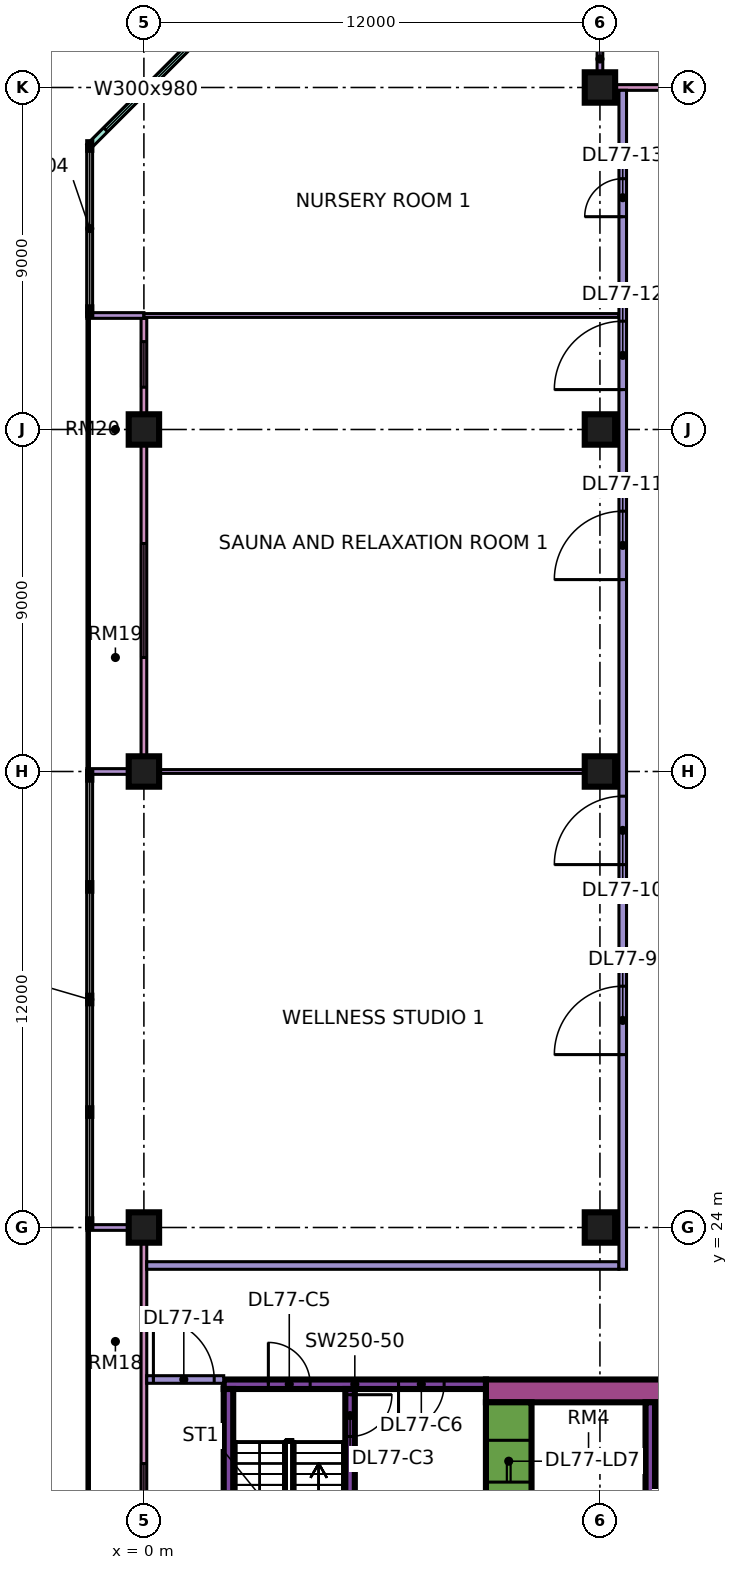
"""IFC4 building model, lengths in metres.
Left out: names, types, materials, properties, quantities, classifications, styles, units other than length and angle.
Written with IfcOpenShell. Run it as: python <this file> out.ifc"""

import sys

from ifc_helpers import new_model, si_unit, direction, frame, frame_2d, origin, origin_2d, place, context, subcontext, project, spatial, rectangle, extrude, element, fill, save


model = new_model("IFC4")
c1 = context("Model", 3, precision=1e-05, world=origin(), true_north=direction((0.0, 1.0)))
c2 = subcontext(c1, "Body", "Model", "MODEL_VIEW")
j1 = project(units=[si_unit("LENGTHUNIT", "METRE"), si_unit("PLANEANGLEUNIT", "RADIAN")], contexts=[c1])
p1 = place(None, origin())
s1 = spatial("IfcSite", under=j1, at=p1, CompositionType="ELEMENT")
p2 = place(p1, origin())
s2 = spatial("IfcBuilding", under=s1, at=p2, CompositionType="ELEMENT")
p3 = place(p2, frame((0.0, 0.0, 327.65)))
s3 = spatial("IfcBuildingStorey", under=s2, at=p3, CompositionType="ELEMENT", Elevation=327.65)
p4 = place(p3, frame((0.0, 24.0, 0.0), z_axis=(0.0, 0.0, 1.0), x_axis=(1.0, 0.0, 0.0)))
e1 = element("IfcColumn", 1, at=p4, inside=s3, PredefinedType="COLUMN", context=c2, shape_type="SweptSolid", body=[
    extrude(rectangle(XDim=0.8, YDim=0.8, at=origin_2d()), origin(), (0.0, 0.0, 1.0), 11.25),
])
p5 = place(p3, frame((0.0, 36.0, 0.0), z_axis=(0.0, 0.0, 1.0), x_axis=(1.0, 0.0, 0.0)))
e2 = element("IfcColumn", 2, at=p5, inside=s3, PredefinedType="COLUMN", context=c2, shape_type="SweptSolid", body=[
    extrude(rectangle(XDim=0.8, YDim=0.8, at=origin_2d()), origin(), (0.0, 0.0, 1.0), 11.25),
])
for number, where, z_axis, x_axis in (
    (3, (0.0, 45.0, 0.0), (0.0, 0.0, 1.0), (1.0, 0.0, 0.0)),
    (4, (12.0, 24.0, 0.0), (0.0, 0.0, 1.0), (1.0, 0.0, 0.0)),
    (5, (12.0, 36.0, 0.0), (0.0, 0.0, 1.0), (1.0, 0.0, 0.0)),
    (6, (12.0, 45.0, 0.0), (0.0, 0.0, 1.0), (1.0, 0.0, 0.0)),
    (7, (12.0, 54.0, 0.0), (0.0, 0.0, 1.0), (1.0, 0.0, 0.0)),
):
    element("IfcColumn", number, at=place(p3, frame(where, z_axis=z_axis, x_axis=x_axis)), inside=s3, PredefinedType="COLUMN", context=c2, shape_type="SweptSolid", body=[
        extrude(rectangle(XDim=0.8, YDim=0.8, at=origin_2d()), origin(), (0.0, 0.0, 1.0), 11.25),
    ])
p6 = place(p3, frame((9.0, 19.7, 0.0), z_axis=(0.0, 0.0, 1.0), x_axis=(1.0, 0.0, 0.0)))
e8 = element("IfcWall", 8, at=p6, inside=s3, PredefinedType="SHEAR", context=c2, shape_type="SweptSolid", body=[
    extrude(rectangle(XDim=25.0, YDim=0.6, at=frame_2d((12.5, 0.0))), origin(), (0.0, 0.0, 1.0), 11.25),
])
p7 = place(p6, frame((19.1, 0.0, 0.0)))
e9 = element("IfcOpeningElement", 9, at=p7, cuts=e8, PredefinedType="OPENING", context=c2, shape_type="SweptSolid", body=[
    extrude(rectangle(XDim=1.8, YDim=2.4, at=frame_2d((0.9, 1.2))), frame((0.0, 0.31, 0.0), z_axis=(0.0, -1.0, 0.0), x_axis=(1.0, 0.0, 0.0)), (0.0, 0.0, 1.0), 0.62),
])
p8 = place(p3, frame((9.6, 7.6, 0.0), z_axis=(0.0, 0.0, 1.0), x_axis=(0.0, 1.0, 0.0)))
e10 = element("IfcWall", 10, at=p8, inside=s3, PredefinedType="SHEAR", context=c2, shape_type="SweptSolid", body=[
    extrude(rectangle(XDim=11.8, YDim=1.2, at=frame_2d((5.9, 0.0))), origin(), (0.0, 0.0, 1.0), 11.25),
])
p9 = place(p8, frame((4.275, 0.0, 0.0)))
e11 = element("IfcOpeningElement", 11, at=p9, cuts=e10, PredefinedType="OPENING", context=c2, shape_type="SweptSolid", body=[
    extrude(rectangle(XDim=1.1, YDim=2.2, at=frame_2d((0.55, 1.1))), frame((0.0, 0.61, 0.0), z_axis=(0.0, -1.0, 0.0), x_axis=(1.0, 0.0, 0.0)), (0.0, 0.0, 1.0), 1.22),
])
p10 = place(p8, frame((6.775, 0.0, 0.0)))
e12 = element("IfcOpeningElement", 12, at=p10, cuts=e10, PredefinedType="OPENING", context=c2, shape_type="SweptSolid", body=[
    extrude(rectangle(XDim=1.1, YDim=2.2, at=frame_2d((0.55, 1.1))), frame((0.0, 0.61, 0.0), z_axis=(0.0, -1.0, 0.0), x_axis=(1.0, 0.0, 0.0)), (0.0, 0.0, 1.0), 1.22),
])
p11 = place(p8, frame((9.7, 0.0, 0.0)))
e13 = element("IfcOpeningElement", 13, at=p11, cuts=e10, PredefinedType="OPENING", context=c2, shape_type="SweptSolid", body=[
    extrude(rectangle(XDim=1.1, YDim=2.2, at=frame_2d((0.55, 1.1))), frame((0.0, 0.61, 0.0), z_axis=(0.0, -1.0, 0.0), x_axis=(1.0, 0.0, 0.0)), (0.0, 0.0, 1.0), 1.22),
])
p12 = place(p8, frame((1.95, 0.0, 0.0)))
e14 = element("IfcOpeningElement", 14, at=p12, cuts=e10, PredefinedType="OPENING", context=c2, shape_type="SweptSolid", body=[
    extrude(rectangle(XDim=0.9, YDim=2.1, at=frame_2d((0.45, 1.05))), frame((0.0, 0.61, 0.0), z_axis=(0.0, -1.0, 0.0), x_axis=(1.0, 0.0, 0.0)), (0.0, 0.0, 1.0), 1.22),
])
p13 = place(p3, frame((13.325, 7.6, 0.0), z_axis=(0.0, 0.0, 1.0), x_axis=(0.0, 1.0, 0.0)))
e15 = element("IfcWall", 15, at=p13, inside=s3, PredefinedType="SHEAR", context=c2, shape_type="SweptSolid", body=[
    extrude(rectangle(XDim=11.8, YDim=0.25, at=frame_2d((5.9, 0.0))), origin(), (0.0, 0.0, 1.0), 11.25),
])
p14 = place(p3, frame((2.1, 19.875, 0.0), z_axis=(0.0, 0.0, 1.0), x_axis=(1.0, 0.0, 0.0)))
e16 = element("IfcWall", 16, at=p14, inside=s3, PredefinedType="SHEAR", context=c2, shape_type="SweptSolid", body=[
    extrude(rectangle(XDim=6.9, YDim=0.25, at=frame_2d((3.45, 0.0))), origin(), (0.0, 0.0, 1.0), 11.25),
])
p15 = place(p14, frame((1.175, 0.0, 0.0)))
e17 = element("IfcOpeningElement", 17, at=p15, cuts=e16, PredefinedType="OPENING", context=c2, shape_type="SweptSolid", body=[
    extrude(rectangle(XDim=1.1, YDim=2.2, at=frame_2d((0.55, 1.1))), frame((0.0, 0.135, 0.0), z_axis=(0.0, -1.0, 0.0), x_axis=(1.0, 0.0, 0.0)), (0.0, 0.0, 1.0), 0.27),
])
p16 = place(p14, frame((4.6, 0.0, 0.0)))
e18 = element("IfcOpeningElement", 18, at=p16, cuts=e16, PredefinedType="OPENING", context=c2, shape_type="SweptSolid", body=[
    extrude(rectangle(XDim=1.2, YDim=2.2, at=frame_2d((0.6, 1.1))), frame((0.0, 0.135, 0.0), z_axis=(0.0, -1.0, 0.0), x_axis=(1.0, 0.0, 0.0)), (0.0, 0.0, 1.0), 0.27),
])
p17 = place(p3, frame((2.225, 13.25, 0.0), z_axis=(0.0, 0.0, 1.0), x_axis=(0.0, 1.0, 0.0)))
e19 = element("IfcWall", 19, at=p17, inside=s3, PredefinedType="SHEAR", context=c2, shape_type="SweptSolid", body=[
    extrude(rectangle(XDim=6.5, YDim=0.25, at=frame_2d((3.25, 0.0))), origin(), (0.0, 0.0, 1.0), 11.25),
])
p18 = place(p3, frame((5.425, 13.25, 0.0), z_axis=(0.0, 0.0, 1.0), x_axis=(0.0, 1.0, 0.0)))
e20 = element("IfcWall", 20, at=p18, inside=s3, PredefinedType="SHEAR", context=c2, shape_type="SweptSolid", body=[
    extrude(rectangle(XDim=6.5, YDim=0.25, at=frame_2d((3.25, 0.0))), origin(), (0.0, 0.0, 1.0), 11.25),
])
p19 = place(p18, frame((5.25, 0.0, 0.0)))
e21 = element("IfcOpeningElement", 21, at=p19, cuts=e20, PredefinedType="OPENING", context=c2, shape_type="SweptSolid", body=[
    extrude(rectangle(XDim=1.1, YDim=2.2, at=frame_2d((0.55, 1.1))), frame((0.0, 0.135, 0.0), z_axis=(0.0, -1.0, 0.0), x_axis=(1.0, 0.0, 0.0)), (0.0, 0.0, 1.0), 0.27),
])
p20 = place(p3, frame((22.425, 54.0, 0.0), z_axis=(0.0, 0.0, 1.0), x_axis=(-1.0, 0.0, 0.0)))
e22 = element("IfcWall", 22, at=p20, inside=s3, PredefinedType="SOLIDWALL", context=c2, shape_type="SweptSolid", body=[
    extrude(rectangle(XDim=10.35, YDim=0.15, at=frame_2d((5.175, 0.0))), origin(), (0.0, 0.0, 1.0), 10.85),
])
p21 = place(p20, frame((1.913, 0.0, 0.45)))
e23 = element("IfcOpeningElement", 23, at=p21, cuts=e22, PredefinedType="OPENING", context=c2, shape_type="SweptSolid", body=[
    extrude(rectangle(XDim=3.0, YDim=9.8, at=frame_2d((1.5, 4.9))), frame((0.0, 0.085, 0.0), z_axis=(0.0, -1.0, 0.0), x_axis=(1.0, 0.0, 0.0)), (0.0, 0.0, 1.0), 0.17),
])
p22 = place(p3, frame((12.0, 55.5, 0.0), z_axis=(0.0, 0.0, 1.0), x_axis=(0.0, -1.0, 0.0)))
e24 = element("IfcWall", 24, at=p22, inside=s3, PredefinedType="SOLIDWALL", context=c2, shape_type="SweptSolid", body=[
    extrude(rectangle(XDim=1.5, YDim=0.15, at=frame_2d((0.75, 0.0))), origin(), (0.0, 0.0, 1.0), 10.85),
])
p23 = place(p3, frame((1.553, 55.447, 0.0), z_axis=(0.0, 0.0, 1.0), x_axis=(-0.707106781187, -0.707106781187, 0.0)))
e25 = element("IfcWall", 25, at=p23, inside=s3, PredefinedType="SOLIDWALL", context=c2, shape_type="SweptSolid", body=[
    extrude(rectangle(XDim=4.243, YDim=0.15, at=frame_2d((2.121, 0.0))), origin(), (0.0, 0.0, 1.0), 10.85),
])
p24 = place(p23, frame((0.621, 0.0, 0.45)))
e26 = element("IfcOpeningElement", 26, at=p24, cuts=e25, PredefinedType="OPENING", context=c2, shape_type="SweptSolid", body=[
    extrude(rectangle(XDim=3.0, YDim=9.8, at=frame_2d((1.5, 4.9))), frame((0.0, 0.085, 0.0), z_axis=(0.0, -1.0, 0.0), x_axis=(1.0, 0.0, 0.0)), (0.0, 0.0, 1.0), 0.17),
])
p25 = place(p3, frame((0.0, 47.925, 0.0), z_axis=(0.0, 0.0, 1.0), x_axis=(0.0, -1.0, 0.0)))
e27 = element("IfcWall", 27, at=p25, inside=s3, PredefinedType="SOLIDWALL", context=c2, shape_type="SweptSolid", body=[
    extrude(rectangle(XDim=11.85, YDim=0.15, at=frame_2d((5.925, 0.0))), origin(), (0.0, 0.0, 1.0), 10.85),
])
p26 = place(p25, frame((0.613, 0.0, 0.45)))
e28 = element("IfcOpeningElement", 28, at=p26, cuts=e27, PredefinedType="OPENING", context=c2, shape_type="SweptSolid", body=[
    extrude(rectangle(XDim=1.2, YDim=9.8, at=frame_2d((0.6, 4.9))), frame((0.0, 0.085, 0.0), z_axis=(0.0, -1.0, 0.0), x_axis=(1.0, 0.0, 0.0)), (0.0, 0.0, 1.0), 0.17),
])
p27 = place(p25, frame((5.925, 0.0, 0.45)))
e29 = element("IfcOpeningElement", 29, at=p27, cuts=e27, PredefinedType="OPENING", context=c2, shape_type="SweptSolid", body=[
    extrude(rectangle(XDim=3.0, YDim=9.8, at=frame_2d((1.5, 4.9))), frame((0.0, 0.085, 0.0), z_axis=(0.0, -1.0, 0.0), x_axis=(1.0, 0.0, 0.0)), (0.0, 0.0, 1.0), 0.17),
])
for number, where, z_axis, x_axis in (
    (30, (-1.5, 48.0, 0.0), (0.0, 0.0, 1.0), (1.0, 0.0, 0.0)),
    (31, (-1.5, 36.0, 0.0), (0.0, 0.0, 1.0), (1.0, 0.0, 0.0)),
):
    element("IfcWall", number, at=place(p3, frame(where, z_axis=z_axis, x_axis=x_axis)), inside=s3, PredefinedType="SOLIDWALL", context=c2, shape_type="SweptSolid", body=[
        extrude(rectangle(XDim=1.5, YDim=0.15, at=frame_2d((0.75, 0.0))), origin(), (0.0, 0.0, 1.0), 10.85),
    ])
p28 = place(p3, frame((0.0, 23.925, 0.0), z_axis=(0.0, 0.0, 1.0), x_axis=(0.0, -1.0, 0.0)))
e32 = element("IfcWall", 32, at=p28, inside=s3, PredefinedType="SOLIDWALL", context=c2, shape_type="SweptSolid", body=[
    extrude(rectangle(XDim=11.35, YDim=0.15, at=frame_2d((5.675, 0.0))), origin(), (0.0, 0.0, 1.0), 10.85),
])
p29 = place(p28, frame((6.137, 0.0, 0.45)))
e33 = element("IfcOpeningElement", 33, at=p29, cuts=e32, PredefinedType="OPENING", context=c2, shape_type="SweptSolid", body=[
    extrude(rectangle(XDim=3.0, YDim=9.8, at=frame_2d((1.5, 4.9))), frame((0.0, 0.085, 0.0), z_axis=(0.0, -1.0, 0.0), x_axis=(1.0, 0.0, 0.0)), (0.0, 0.0, 1.0), 0.17),
])
p30 = place(p3, frame((-1.5, 24.0, 0.0), z_axis=(0.0, 0.0, 1.0), x_axis=(1.0, 0.0, 0.0)))
e34 = element("IfcWall", 34, at=p30, inside=s3, PredefinedType="SOLIDWALL", context=c2, shape_type="SweptSolid", body=[
    extrude(rectangle(XDim=1.5, YDim=0.15, at=frame_2d((0.75, 0.0))), origin(), (0.0, 0.0, 1.0), 10.85),
])
e35 = element("IfcWall", 35, at=p5, inside=s3, PredefinedType="PARTITIONING", context=c2, shape_type="SweptSolid", body=[
    extrude(rectangle(XDim=12.5, YDim=0.1, at=frame_2d((6.25, 0.0))), origin(), (0.0, 0.0, 1.0), 10.85),
])
p31 = place(p3, frame((0.0, 48.0, 0.0), z_axis=(0.0, 0.0, 1.0), x_axis=(1.0, 0.0, 0.0)))
e36 = element("IfcWall", 36, at=p31, inside=s3, PredefinedType="PARTITIONING", context=c2, shape_type="SweptSolid", body=[
    extrude(rectangle(XDim=12.5, YDim=0.1, at=frame_2d((6.25, 0.0))), origin(), (0.0, 0.0, 1.0), 10.85),
])
p32 = place(p3, frame((0.074, 20.0, 0.0), z_axis=(0.0, 0.0, 1.0), x_axis=(1.0, 0.0, 0.0)))
e37 = element("IfcWall", 37, at=p32, inside=s3, PredefinedType="PARTITIONING", context=c2, shape_type="SweptSolid", body=[
    extrude(rectangle(XDim=2.026, YDim=0.2, at=frame_2d((1.013, 0.0))), origin(), (0.0, 0.0, 1.0), 10.85),
])
p33 = place(p32, frame((0.176, 0.0, 0.0)))
e38 = element("IfcOpeningElement", 38, at=p33, cuts=e37, PredefinedType="OPENING", context=c2, shape_type="SweptSolid", body=[
    extrude(rectangle(XDim=1.6, YDim=2.1, at=frame_2d((0.8, 1.05))), frame((0.0, 0.11, 0.0), z_axis=(0.0, -1.0, 0.0), x_axis=(1.0, 0.0, 0.0)), (0.0, 0.0, 1.0), 0.22),
])
p34 = place(p3, frame((0.074, 23.0, 0.0), z_axis=(0.0, 0.0, 1.0), x_axis=(1.0, 0.0, 0.0)))
e39 = element("IfcWall", 39, at=p34, inside=s3, PredefinedType="PARTITIONING", context=c2, shape_type="SweptSolid", body=[
    extrude(rectangle(XDim=12.426, YDim=0.2, at=frame_2d((6.213, 0.0))), origin(), (0.0, 0.0, 1.0), 10.85),
])
p35 = place(p3, frame((12.6, 22.9, 0.0), z_axis=(0.0, 0.0, 1.0), x_axis=(0.0, 1.0, 0.0)))
e40 = element("IfcWall", 40, at=p35, inside=s3, PredefinedType="PARTITIONING", context=c2, shape_type="SweptSolid", body=[
    extrude(rectangle(XDim=31.026, YDim=0.2, at=frame_2d((15.513, 0.0))), origin(), (0.0, 0.0, 1.0), 10.85),
])
p36 = place(p35, frame((5.65, 0.0, 0.0)))
e41 = element("IfcOpeningElement", 41, at=p36, cuts=e40, PredefinedType="OPENING", context=c2, shape_type="SweptSolid", body=[
    extrude(rectangle(XDim=1.8, YDim=2.1, at=frame_2d((0.9, 1.05))), frame((0.0, 0.11, 0.0), z_axis=(0.0, -1.0, 0.0), x_axis=(1.0, 0.0, 0.0)), (0.0, 0.0, 1.0), 0.22),
])
p37 = place(p35, frame((10.65, 0.0, 0.0)))
e42 = element("IfcOpeningElement", 42, at=p37, cuts=e40, PredefinedType="OPENING", context=c2, shape_type="SweptSolid", body=[
    extrude(rectangle(XDim=1.8, YDim=2.1, at=frame_2d((0.9, 1.05))), frame((0.0, 0.11, 0.0), z_axis=(0.0, -1.0, 0.0), x_axis=(1.0, 0.0, 0.0)), (0.0, 0.0, 1.0), 0.22),
])
p38 = place(p35, frame((18.15, 0.0, 0.0)))
e43 = element("IfcOpeningElement", 43, at=p38, cuts=e40, PredefinedType="OPENING", context=c2, shape_type="SweptSolid", body=[
    extrude(rectangle(XDim=1.8, YDim=2.1, at=frame_2d((0.9, 1.05))), frame((0.0, 0.11, 0.0), z_axis=(0.0, -1.0, 0.0), x_axis=(1.0, 0.0, 0.0)), (0.0, 0.0, 1.0), 0.22),
])
p39 = place(p35, frame((23.15, 0.0, 0.0)))
e44 = element("IfcOpeningElement", 44, at=p39, cuts=e40, PredefinedType="OPENING", context=c2, shape_type="SweptSolid", body=[
    extrude(rectangle(XDim=1.8, YDim=2.1, at=frame_2d((0.9, 1.05))), frame((0.0, 0.11, 0.0), z_axis=(0.0, -1.0, 0.0), x_axis=(1.0, 0.0, 0.0)), (0.0, 0.0, 1.0), 0.22),
])
p40 = place(p35, frame((27.7, 0.0, 0.0)))
e45 = element("IfcOpeningElement", 45, at=p40, cuts=e40, PredefinedType="OPENING", context=c2, shape_type="SweptSolid", body=[
    extrude(rectangle(XDim=1.0, YDim=2.1, at=frame_2d((0.5, 1.05))), frame((0.0, 0.11, 0.0), z_axis=(0.0, -1.0, 0.0), x_axis=(1.0, 0.0, 0.0)), (0.0, 0.0, 1.0), 0.22),
])
p41 = place(p24, origin())
e46 = element("IfcWindow", 46, at=p41, inside=s3, PartitioningType="SINGLE_PANEL", PredefinedType="WINDOW", context=c2, shape_type="SweptSolid", body=[
    extrude(rectangle(XDim=3.0, YDim=9.8, at=frame_2d((1.5, 4.9))), frame((0.0, 0.03, 0.0), z_axis=(0.0, -1.0, 0.0), x_axis=(1.0, 0.0, 0.0)), (0.0, 0.0, 1.0), 0.06),
])
fill(e26, e46)
p42 = place(p26, origin())
e47 = element("IfcWindow", 47, at=p42, inside=s3, PartitioningType="SINGLE_PANEL", PredefinedType="WINDOW", context=c2, shape_type="SweptSolid", body=[
    extrude(rectangle(XDim=1.2, YDim=9.8, at=frame_2d((0.6, 4.9))), frame((0.0, 0.03, 0.0), z_axis=(0.0, -1.0, 0.0), x_axis=(1.0, 0.0, 0.0)), (0.0, 0.0, 1.0), 0.06),
])
fill(e28, e47)
p43 = place(p27, origin())
e48 = element("IfcWindow", 48, at=p43, inside=s3, PartitioningType="SINGLE_PANEL", PredefinedType="WINDOW", context=c2, shape_type="SweptSolid", body=[
    extrude(rectangle(XDim=3.0, YDim=9.8, at=frame_2d((1.5, 4.9))), frame((0.0, 0.03, 0.0), z_axis=(0.0, -1.0, 0.0), x_axis=(1.0, 0.0, 0.0)), (0.0, 0.0, 1.0), 0.06),
])
fill(e29, e48)
p44 = place(p29, origin())
e49 = element("IfcWindow", 49, at=p44, inside=s3, PartitioningType="SINGLE_PANEL", PredefinedType="WINDOW", context=c2, shape_type="SweptSolid", body=[
    extrude(rectangle(XDim=3.0, YDim=9.8, at=frame_2d((1.5, 4.9))), frame((0.0, 0.03, 0.0), z_axis=(0.0, -1.0, 0.0), x_axis=(1.0, 0.0, 0.0)), (0.0, 0.0, 1.0), 0.06),
])
fill(e33, e49)
p45 = place(p11, origin())
e50 = element("IfcDoor", 50, at=p45, inside=s3, OperationType="DOUBLE_DOOR_SLIDING", PredefinedType="DOOR", context=c2, shape_type="SweptSolid", body=[
    extrude(rectangle(XDim=1.1, YDim=2.2, at=frame_2d((0.55, 1.1))), frame((0.0, 0.025, 0.0), z_axis=(0.0, -1.0, 0.0), x_axis=(1.0, 0.0, 0.0)), (0.0, 0.0, 1.0), 0.05),
])
fill(e13, e50)
p46 = place(p19, origin())
e51 = element("IfcDoor", 51, at=p46, inside=s3, OperationType="SINGLE_SWING_RIGHT", PredefinedType="DOOR", context=c2, shape_type="SweptSolid", body=[
    extrude(rectangle(XDim=1.1, YDim=2.2, at=frame_2d((0.55, 1.1))), frame((0.0, 0.025, 0.0), z_axis=(0.0, -1.0, 0.0), x_axis=(1.0, 0.0, 0.0)), (0.0, 0.0, 1.0), 0.05),
])
fill(e21, e51)
p47 = place(p15, origin())
e52 = element("IfcDoor", 52, at=p47, inside=s3, OperationType="SINGLE_SWING_LEFT", PredefinedType="DOOR", context=c2, shape_type="SweptSolid", body=[
    extrude(rectangle(XDim=1.1, YDim=2.2, at=frame_2d((0.55, 1.1))), frame((0.0, 0.025, 0.0), z_axis=(0.0, -1.0, 0.0), x_axis=(1.0, 0.0, 0.0)), (0.0, 0.0, 1.0), 0.05),
])
fill(e17, e52)
p48 = place(p16, frame((1.2, 0.0, 0.0), z_axis=(0.0, 0.0, 1.0), x_axis=(-1.0, 0.0, 0.0)))
e53 = element("IfcDoor", 53, at=p48, inside=s3, OperationType="SINGLE_SWING_LEFT", PredefinedType="DOOR", context=c2, shape_type="SweptSolid", body=[
    extrude(rectangle(XDim=1.2, YDim=2.2, at=frame_2d((0.6, 1.1))), frame((0.0, 0.025, 0.0), z_axis=(0.0, -1.0, 0.0), x_axis=(1.0, 0.0, 0.0)), (0.0, 0.0, 1.0), 0.05),
])
fill(e18, e53)
p49 = place(p36, origin())
e54 = element("IfcDoor", 54, at=p49, inside=s3, OperationType="DOUBLE_DOOR_SINGLE_SWING", PredefinedType="DOOR", context=c2, shape_type="SweptSolid", body=[
    extrude(rectangle(XDim=1.8, YDim=2.1, at=frame_2d((0.9, 1.05))), frame((0.0, 0.025, 0.0), z_axis=(0.0, -1.0, 0.0), x_axis=(1.0, 0.0, 0.0)), (0.0, 0.0, 1.0), 0.05),
])
fill(e41, e54)
p50 = place(p37, origin())
e55 = element("IfcDoor", 55, at=p50, inside=s3, OperationType="DOUBLE_DOOR_SINGLE_SWING", PredefinedType="DOOR", context=c2, shape_type="SweptSolid", body=[
    extrude(rectangle(XDim=1.8, YDim=2.1, at=frame_2d((0.9, 1.05))), frame((0.0, 0.025, 0.0), z_axis=(0.0, -1.0, 0.0), x_axis=(1.0, 0.0, 0.0)), (0.0, 0.0, 1.0), 0.05),
])
fill(e42, e55)
p51 = place(p38, origin())
e56 = element("IfcDoor", 56, at=p51, inside=s3, OperationType="DOUBLE_DOOR_SINGLE_SWING", PredefinedType="DOOR", context=c2, shape_type="SweptSolid", body=[
    extrude(rectangle(XDim=1.8, YDim=2.1, at=frame_2d((0.9, 1.05))), frame((0.0, 0.025, 0.0), z_axis=(0.0, -1.0, 0.0), x_axis=(1.0, 0.0, 0.0)), (0.0, 0.0, 1.0), 0.05),
])
fill(e43, e56)
p52 = place(p39, origin())
e57 = element("IfcDoor", 57, at=p52, inside=s3, OperationType="DOUBLE_DOOR_SINGLE_SWING", PredefinedType="DOOR", context=c2, shape_type="SweptSolid", body=[
    extrude(rectangle(XDim=1.8, YDim=2.1, at=frame_2d((0.9, 1.05))), frame((0.0, 0.025, 0.0), z_axis=(0.0, -1.0, 0.0), x_axis=(1.0, 0.0, 0.0)), (0.0, 0.0, 1.0), 0.05),
])
fill(e44, e57)
p53 = place(p40, origin())
e58 = element("IfcDoor", 58, at=p53, inside=s3, OperationType="SINGLE_SWING_LEFT", PredefinedType="DOOR", context=c2, shape_type="SweptSolid", body=[
    extrude(rectangle(XDim=1.0, YDim=2.1, at=frame_2d((0.5, 1.05))), frame((0.0, 0.025, 0.0), z_axis=(0.0, -1.0, 0.0), x_axis=(1.0, 0.0, 0.0)), (0.0, 0.0, 1.0), 0.05),
])
fill(e45, e58)
p54 = place(p33, origin())
e59 = element("IfcDoor", 59, at=p54, inside=s3, OperationType="DOUBLE_DOOR_SINGLE_SWING", PredefinedType="DOOR", context=c2, shape_type="SweptSolid", body=[
    extrude(rectangle(XDim=1.6, YDim=2.1, at=frame_2d((0.8, 1.05))), frame((0.0, 0.025, 0.0), z_axis=(0.0, -1.0, 0.0), x_axis=(1.0, 0.0, 0.0)), (0.0, 0.0, 1.0), 0.05),
])
fill(e38, e59)
save(model, sys.argv[1])
